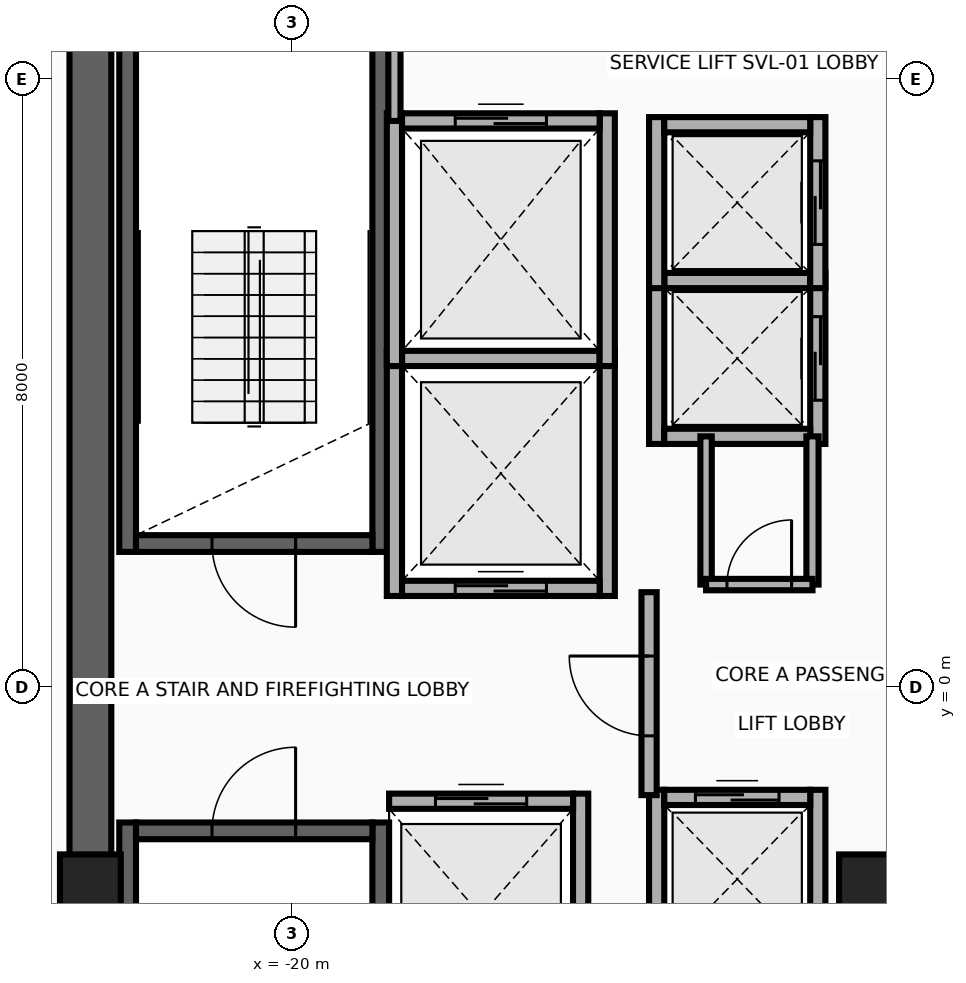
"""IFC4 building model, lengths in metres.
Left out: names, types, materials, properties, quantities, classifications, styles, units other than length and angle.
Written with IfcOpenShell. Run it as: python <this file> out.ifc"""

import sys

from ifc_helpers import new_model, si_unit, direction, frame, frame_2d, origin, origin_2d, place, context, subcontext, project, spatial, rectangle, extrude, source, transform, mapped, element, fill, save


model = new_model("IFC4")
c1 = context("Model", 3, precision=1e-05, world=origin(), true_north=direction((0.0, 1.0)))
c2 = subcontext(c1, "Body", "Model", "MODEL_VIEW")
j1 = project(units=[si_unit("LENGTHUNIT", "METRE"), si_unit("PLANEANGLEUNIT", "RADIAN")], contexts=[c1])
p1 = place(None, origin())
s1 = spatial("IfcSite", under=j1, at=p1, CompositionType="ELEMENT")
p2 = place(p1, origin())
s2 = spatial("IfcBuilding", under=s1, at=p2, CompositionType="ELEMENT")
p3 = place(p2, frame((0.0, 0.0, 266.0)))
s3 = spatial("IfcBuildingStorey", under=s2, at=p3, CompositionType="ELEMENT", Elevation=266.0)
for number, where, z_axis, x_axis in (
    (1, (-22.16, 1.78, 0.0), (0.0, 0.0, 1.0), (0.0, 1.0, 0.0)),
    (2, (-18.83, 1.78, 0.0), (0.0, 0.0, 1.0), (0.0, 1.0, 0.0)),
):
    element("IfcWall", number, at=place(p3, frame(where, z_axis=z_axis, x_axis=x_axis)), inside=s3, PredefinedType="SHEAR", context=c2, shape_type="SweptSolid", body=[
        extrude(rectangle(XDim=8.745, YDim=0.22, at=frame_2d((4.373, 0.0))), origin(), (0.0, 0.0, 1.0), 3.26),
    ])
p4 = place(p3, frame((-22.05, 1.89, 0.0), z_axis=(0.0, 0.0, 1.0), x_axis=(1.0, 0.0, 0.0)))
e3 = element("IfcWall", 3, at=p4, inside=s3, PredefinedType="SHEAR", context=c2, shape_type="SweptSolid", body=[
    extrude(rectangle(XDim=3.11, YDim=0.22, at=frame_2d((1.555, 0.0))), origin(), (0.0, 0.0, 1.0), 3.26),
])
p5 = place(p4, frame((1.0, 0.0, 0.0)))
e4 = element("IfcOpeningElement", 4, at=p5, cuts=e3, PredefinedType="OPENING", context=c2, shape_type="SweptSolid", body=[
    extrude(rectangle(XDim=1.1, YDim=2.15, at=frame_2d((0.55, 1.075))), frame((0.0, 0.125, 0.0), z_axis=(0.0, -1.0, 0.0), x_axis=(1.0, 0.0, 0.0)), (0.0, 0.0, 1.0), 0.25),
])
for number, where, z_axis, x_axis in (
    (5, (-22.16, -10.525, 0.0), (0.0, 0.0, 1.0), (0.0, 1.0, 0.0)),
    (6, (-18.83, -10.525, 0.0), (0.0, 0.0, 1.0), (0.0, 1.0, 0.0)),
):
    element("IfcWall", number, at=place(p3, frame(where, z_axis=z_axis, x_axis=x_axis)), inside=s3, PredefinedType="SHEAR", context=c2, shape_type="SweptSolid", body=[
        extrude(rectangle(XDim=8.745, YDim=0.22, at=frame_2d((4.373, 0.0))), origin(), (0.0, 0.0, 1.0), 3.26),
    ])
p6 = place(p3, frame((-22.05, -1.89, 0.0), z_axis=(0.0, 0.0, 1.0), x_axis=(1.0, 0.0, 0.0)))
e7 = element("IfcWall", 7, at=p6, inside=s3, PredefinedType="SHEAR", context=c2, shape_type="SweptSolid", body=[
    extrude(rectangle(XDim=3.11, YDim=0.22, at=frame_2d((1.555, 0.0))), origin(), (0.0, 0.0, 1.0), 3.26),
])
p7 = place(p6, frame((1.0, 0.0, 0.0)))
e8 = element("IfcOpeningElement", 8, at=p7, cuts=e7, PredefinedType="OPENING", context=c2, shape_type="SweptSolid", body=[
    extrude(rectangle(XDim=1.1, YDim=2.15, at=frame_2d((0.55, 1.075))), frame((0.0, 0.125, 0.0), z_axis=(0.0, -1.0, 0.0), x_axis=(1.0, 0.0, 0.0)), (0.0, 0.0, 1.0), 0.25),
])
p8 = place(p3, frame((-22.65, -11.075, 0.0), z_axis=(0.0, 0.0, 1.0), x_axis=(0.0, 1.0, 0.0)))
e9 = element("IfcWall", 9, at=p8, inside=s3, PredefinedType="SHEAR", context=c2, shape_type="SweptSolid", body=[
    extrude(rectangle(XDim=22.15, YDim=0.55, at=frame_2d((11.075, 0.0))), origin(), (0.0, 0.0, 1.0), 3.26),
])
m1 = source(origin(), c2, "Body", "SweptSolid", [
    extrude(rectangle(XDim=0.8, YDim=0.8, at=origin_2d()), origin(), (0.0, 0.0, 1.0), 3.5),
])
for number, where, z_axis, x_axis in (
    (10, (-22.65, -2.6, 0.0), (0.0, 0.0, 1.0), (1.0, 0.0, 0.0)),
    (11, (-12.4, -2.6, 0.0), (0.0, 0.0, 1.0), (1.0, 0.0, 0.0)),
):
    element("IfcColumn", number, at=place(p3, frame(where, z_axis=z_axis, x_axis=x_axis)), inside=s3, PredefinedType="COLUMN", context=c2, shape_type="MappedRepresentation", body=[
        mapped(m1, transform((0.0, 0.0, 0.0), x_axis=(1.0, 0.0, 0.0), y_axis=(0.0, 1.0, 0.0), z_axis=(0.0, 0.0, 1.0), scale=1.0)),
    ])
for number, where, z_axis, x_axis in (
    (12, (-18.65, 1.2, 0.0), (0.0, 0.0, 1.0), (0.0, 1.0, 0.0)),
    (13, (-15.85, 1.2, 0.0), (0.0, 0.0, 1.0), (0.0, 1.0, 0.0)),
):
    element("IfcWall", number, at=place(p3, frame(where, z_axis=z_axis, x_axis=x_axis)), inside=s3, PredefinedType="MOVABLE", context=c2, shape_type="SweptSolid", body=[
        extrude(rectangle(XDim=3.225, YDim=0.2, at=frame_2d((1.613, 0.0))), origin(), (0.0, 0.0, 1.0), 3.26),
    ])
p9 = place(p3, frame((-18.55, 1.3, 0.0), z_axis=(0.0, 0.0, 1.0), x_axis=(1.0, 0.0, 0.0)))
e14 = element("IfcWall", 14, at=p9, inside=s3, PredefinedType="MOVABLE", context=c2, shape_type="SweptSolid", body=[
    extrude(rectangle(XDim=2.6, YDim=0.2, at=frame_2d((1.3, 0.0))), origin(), (0.0, 0.0, 1.0), 3.26),
])
p10 = place(p9, frame((0.7, 0.0, 0.0)))
e15 = element("IfcOpeningElement", 15, at=p10, cuts=e14, PredefinedType="OPENING", context=c2, shape_type="SweptSolid", body=[
    extrude(rectangle(XDim=1.2, YDim=2.1, at=frame_2d((0.6, 1.05))), frame((0.0, 0.115, 0.0), z_axis=(0.0, -1.0, 0.0), x_axis=(1.0, 0.0, 0.0)), (0.0, 0.0, 1.0), 0.23),
])
p11 = place(p3, frame((-18.55, 4.325, 0.0), z_axis=(0.0, 0.0, 1.0), x_axis=(1.0, 0.0, 0.0)))
e16 = element("IfcWall", 16, at=p11, inside=s3, PredefinedType="MOVABLE", context=c2, shape_type="SweptSolid", body=[
    extrude(rectangle(XDim=2.6, YDim=0.2, at=frame_2d((1.3, 0.0))), origin(), (0.0, 0.0, 1.0), 3.26),
])
p12 = place(p3, frame((-16.2, -4.6, 0.0), z_axis=(0.0, 0.0, 1.0), x_axis=(0.0, 1.0, 0.0)))
e17 = element("IfcWall", 17, at=p12, inside=s3, PredefinedType="MOVABLE", context=c2, shape_type="SweptSolid", body=[
    extrude(rectangle(XDim=3.2, YDim=0.2, at=frame_2d((1.6, 0.0))), origin(), (0.0, 0.0, 1.0), 3.26),
])
p13 = place(p3, frame((-18.72, -1.5, 0.0), z_axis=(0.0, 0.0, 1.0), x_axis=(1.0, 0.0, 0.0)))
e18 = element("IfcWall", 18, at=p13, inside=s3, PredefinedType="MOVABLE", context=c2, shape_type="SweptSolid", body=[
    extrude(rectangle(XDim=2.42, YDim=0.2, at=frame_2d((1.21, 0.0))), origin(), (0.0, 0.0, 1.0), 3.26),
])
p14 = place(p13, frame((0.61, 0.0, 0.0)))
e19 = element("IfcOpeningElement", 19, at=p14, cuts=e18, PredefinedType="OPENING", context=c2, shape_type="SweptSolid", body=[
    extrude(rectangle(XDim=1.2, YDim=2.1, at=frame_2d((0.6, 1.05))), frame((0.0, 0.115, 0.0), z_axis=(0.0, -1.0, 0.0), x_axis=(1.0, 0.0, 0.0)), (0.0, 0.0, 1.0), 0.23),
])
for number, where, z_axis, x_axis in (
    (20, (-18.65, 4.225, 0.0), (0.0, 0.0, 1.0), (0.0, 1.0, 0.0)),
    (21, (-15.85, 4.225, 0.0), (0.0, 0.0, 1.0), (0.0, 1.0, 0.0)),
):
    element("IfcWall", number, at=place(p3, frame(where, z_axis=z_axis, x_axis=x_axis)), inside=s3, PredefinedType="MOVABLE", context=c2, shape_type="SweptSolid", body=[
        extrude(rectangle(XDim=3.325, YDim=0.2, at=frame_2d((1.663, 0.0))), origin(), (0.0, 0.0, 1.0), 3.26),
    ])
p15 = place(p3, frame((-18.55, 7.45, 0.0), z_axis=(0.0, 0.0, 1.0), x_axis=(1.0, 0.0, 0.0)))
e22 = element("IfcWall", 22, at=p15, inside=s3, PredefinedType="MOVABLE", context=c2, shape_type="SweptSolid", body=[
    extrude(rectangle(XDim=2.6, YDim=0.2, at=frame_2d((1.3, 0.0))), origin(), (0.0, 0.0, 1.0), 3.26),
])
p16 = place(p15, frame((0.7, 0.0, 0.0)))
e23 = element("IfcOpeningElement", 23, at=p16, cuts=e22, PredefinedType="OPENING", context=c2, shape_type="SweptSolid", body=[
    extrude(rectangle(XDim=1.2, YDim=2.1, at=frame_2d((0.6, 1.05))), frame((0.0, 0.115, 0.0), z_axis=(0.0, -1.0, 0.0), x_axis=(1.0, 0.0, 0.0)), (0.0, 0.0, 1.0), 0.23),
])
p17 = place(p3, frame((-15.2, 3.2, 0.0), z_axis=(0.0, 0.0, 1.0), x_axis=(0.0, 1.0, 0.0)))
e24 = element("IfcWall", 24, at=p17, inside=s3, PredefinedType="MOVABLE", context=c2, shape_type="SweptSolid", body=[
    extrude(rectangle(XDim=2.25, YDim=0.2, at=frame_2d((1.125, 0.0))), origin(), (0.0, 0.0, 1.0), 3.26),
])
p18 = place(p3, frame((-13.08, 3.2, 0.0), z_axis=(0.0, 0.0, 1.0), x_axis=(0.0, 1.0, 0.0)))
e25 = element("IfcWall", 25, at=p18, inside=s3, PredefinedType="MOVABLE", context=c2, shape_type="SweptSolid", body=[
    extrude(rectangle(XDim=2.25, YDim=0.2, at=frame_2d((1.125, 0.0))), origin(), (0.0, 0.0, 1.0), 3.26),
])
p19 = place(p18, frame((0.575, 0.0, 0.0)))
e26 = element("IfcOpeningElement", 26, at=p19, cuts=e25, PredefinedType="OPENING", context=c2, shape_type="SweptSolid", body=[
    extrude(rectangle(XDim=1.1, YDim=2.1, at=frame_2d((0.55, 1.05))), frame((0.0, 0.115, 0.0), z_axis=(0.0, -1.0, 0.0), x_axis=(1.0, 0.0, 0.0)), (0.0, 0.0, 1.0), 0.23),
])
for number, where, z_axis, x_axis in (
    (27, (-15.1, 3.3, 0.0), (0.0, 0.0, 1.0), (1.0, 0.0, 0.0)),
    (28, (-15.1, 5.35, 0.0), (0.0, 0.0, 1.0), (1.0, 0.0, 0.0)),
):
    element("IfcWall", number, at=place(p3, frame(where, z_axis=z_axis, x_axis=x_axis)), inside=s3, PredefinedType="MOVABLE", context=c2, shape_type="SweptSolid", body=[
        extrude(rectangle(XDim=1.92, YDim=0.2, at=frame_2d((0.96, 0.0))), origin(), (0.0, 0.0, 1.0), 3.26),
    ])
p20 = place(p3, frame((-15.2, 5.25, 0.0), z_axis=(0.0, 0.0, 1.0), x_axis=(0.0, 1.0, 0.0)))
e29 = element("IfcWall", 29, at=p20, inside=s3, PredefinedType="MOVABLE", context=c2, shape_type="SweptSolid", body=[
    extrude(rectangle(XDim=2.25, YDim=0.2, at=frame_2d((1.125, 0.0))), origin(), (0.0, 0.0, 1.0), 3.26),
])
p21 = place(p3, frame((-13.08, 5.25, 0.0), z_axis=(0.0, 0.0, 1.0), x_axis=(0.0, 1.0, 0.0)))
e30 = element("IfcWall", 30, at=p21, inside=s3, PredefinedType="MOVABLE", context=c2, shape_type="SweptSolid", body=[
    extrude(rectangle(XDim=2.25, YDim=0.2, at=frame_2d((1.125, 0.0))), origin(), (0.0, 0.0, 1.0), 3.26),
])
p22 = place(p21, frame((0.575, 0.0, 0.0)))
e31 = element("IfcOpeningElement", 31, at=p22, cuts=e30, PredefinedType="OPENING", context=c2, shape_type="SweptSolid", body=[
    extrude(rectangle(XDim=1.1, YDim=2.1, at=frame_2d((0.55, 1.05))), frame((0.0, 0.115, 0.0), z_axis=(0.0, -1.0, 0.0), x_axis=(1.0, 0.0, 0.0)), (0.0, 0.0, 1.0), 0.23),
])
p23 = place(p3, frame((-15.1, 7.4, 0.0), z_axis=(0.0, 0.0, 1.0), x_axis=(1.0, 0.0, 0.0)))
e32 = element("IfcWall", 32, at=p23, inside=s3, PredefinedType="MOVABLE", context=c2, shape_type="SweptSolid", body=[
    extrude(rectangle(XDim=1.92, YDim=0.2, at=frame_2d((0.96, 0.0))), origin(), (0.0, 0.0, 1.0), 3.26),
])
for number, where, z_axis, x_axis in (
    (33, (-15.2, -3.7, 0.0), (0.0, 0.0, 1.0), (0.0, 1.0, 0.0)),
    (34, (-13.08, -3.7, 0.0), (0.0, 0.0, 1.0), (0.0, 1.0, 0.0)),
):
    element("IfcWall", number, at=place(p3, frame(where, z_axis=z_axis, x_axis=x_axis)), inside=s3, PredefinedType="MOVABLE", context=c2, shape_type="SweptSolid", body=[
        extrude(rectangle(XDim=2.35, YDim=0.2, at=frame_2d((1.175, 0.0))), origin(), (0.0, 0.0, 1.0), 3.26),
    ])
p24 = place(p3, frame((-15.1, -1.45, 0.0), z_axis=(0.0, 0.0, 1.0), x_axis=(1.0, 0.0, 0.0)))
e35 = element("IfcWall", 35, at=p24, inside=s3, PredefinedType="MOVABLE", context=c2, shape_type="SweptSolid", body=[
    extrude(rectangle(XDim=1.92, YDim=0.2, at=frame_2d((0.96, 0.0))), origin(), (0.0, 0.0, 1.0), 3.26),
])
p25 = place(p24, frame((0.41, 0.0, 0.0)))
e36 = element("IfcOpeningElement", 36, at=p25, cuts=e35, PredefinedType="OPENING", context=c2, shape_type="SweptSolid", body=[
    extrude(rectangle(XDim=1.1, YDim=2.1, at=frame_2d((0.55, 1.05))), frame((0.0, 0.115, 0.0), z_axis=(0.0, -1.0, 0.0), x_axis=(1.0, 0.0, 0.0)), (0.0, 0.0, 1.0), 0.23),
])
p26 = place(p3, frame((-15.3, -1.42, 0.0), z_axis=(0.0, 0.0, 1.0), x_axis=(0.0, 1.0, 0.0)))
e37 = element("IfcWall", 37, at=p26, inside=s3, PredefinedType="PARTITIONING", context=c2, shape_type="SweptSolid", body=[
    extrude(rectangle(XDim=2.67, YDim=0.2, at=frame_2d((1.335, 0.0))), origin(), (0.0, 0.0, 1.0), 3.26),
])
p27 = place(p26, frame((0.78, 0.0, 0.0)))
e38 = element("IfcOpeningElement", 38, at=p27, cuts=e37, PredefinedType="OPENING", context=c2, shape_type="SweptSolid", body=[
    extrude(rectangle(XDim=1.05, YDim=2.15, at=frame_2d((0.525, 1.075))), frame((0.0, 0.115, 0.0), z_axis=(0.0, -1.0, 0.0), x_axis=(1.0, 0.0, 0.0)), (0.0, 0.0, 1.0), 0.23),
])
p28 = place(p3, frame((-18.65, 7.45, 0.0), z_axis=(0.0, 0.0, 1.0), x_axis=(0.0, 1.0, 0.0)))
e39 = element("IfcWall", 39, at=p28, inside=s3, PredefinedType="PARTITIONING", context=c2, shape_type="SweptSolid", body=[
    extrude(rectangle(XDim=2.93, YDim=0.16, at=frame_2d((1.465, 0.0))), origin(), (0.0, 0.0, 1.0), 3.26),
])
p29 = place(p3, frame((-13.15, 1.35, 0.0), z_axis=(0.0, 0.0, 1.0), x_axis=(0.0, 1.0, 0.0)))
e40 = element("IfcWall", 40, at=p29, inside=s3, PredefinedType="PARTITIONING", context=c2, shape_type="SweptSolid", body=[
    extrude(rectangle(XDim=1.95, YDim=0.16, at=frame_2d((0.975, 0.0))), origin(), (0.0, 0.0, 1.0), 3.26),
])
p30 = place(p3, frame((-14.55, 1.35, 0.0), z_axis=(0.0, 0.0, 1.0), x_axis=(0.0, 1.0, 0.0)))
e41 = element("IfcWall", 41, at=p30, inside=s3, PredefinedType="PARTITIONING", context=c2, shape_type="SweptSolid", body=[
    extrude(rectangle(XDim=1.95, YDim=0.15, at=frame_2d((0.975, 0.0))), origin(), (0.0, 0.0, 1.0), 3.26),
])
p31 = place(p3, frame((-14.55, 1.35, 0.0), z_axis=(0.0, 0.0, 1.0), x_axis=(1.0, 0.0, 0.0)))
e42 = element("IfcWall", 42, at=p31, inside=s3, PredefinedType="PARTITIONING", context=c2, shape_type="SweptSolid", body=[
    extrude(rectangle(XDim=1.4, YDim=0.15, at=frame_2d((0.7, 0.0))), origin(), (0.0, 0.0, 1.0), 3.26),
])
p32 = place(p31, frame((0.275, 0.0, 0.0)))
e43 = element("IfcOpeningElement", 43, at=p32, cuts=e42, PredefinedType="OPENING", context=c2, shape_type="SweptSolid", body=[
    extrude(rectangle(XDim=0.85, YDim=2.05, at=frame_2d((0.425, 1.025))), frame((0.0, 0.09, 0.0), z_axis=(0.0, -1.0, 0.0), x_axis=(1.0, 0.0, 0.0)), (0.0, 0.0, 1.0), 0.18),
])
p33 = place(p10, origin())
e44 = element("IfcDoor", 44, at=p33, inside=s3, OperationType="DOUBLE_DOOR_SLIDING", PredefinedType="DOOR", context=c2, shape_type="SweptSolid", body=[
    extrude(rectangle(XDim=1.2, YDim=2.1, at=frame_2d((0.6, 1.05))), frame((0.0, 0.025, 0.0), z_axis=(0.0, -1.0, 0.0), x_axis=(1.0, 0.0, 0.0)), (0.0, 0.0, 1.0), 0.05),
])
fill(e15, e44)
p34 = place(p14, origin())
e45 = element("IfcDoor", 45, at=p34, inside=s3, OperationType="DOUBLE_DOOR_SLIDING", PredefinedType="DOOR", context=c2, shape_type="SweptSolid", body=[
    extrude(rectangle(XDim=1.2, YDim=2.1, at=frame_2d((0.6, 1.05))), frame((0.0, 0.025, 0.0), z_axis=(0.0, -1.0, 0.0), x_axis=(1.0, 0.0, 0.0)), (0.0, 0.0, 1.0), 0.05),
])
fill(e19, e45)
p35 = place(p16, origin())
e46 = element("IfcDoor", 46, at=p35, inside=s3, OperationType="DOUBLE_DOOR_SLIDING", PredefinedType="DOOR", context=c2, shape_type="SweptSolid", body=[
    extrude(rectangle(XDim=1.2, YDim=2.1, at=frame_2d((0.6, 1.05))), frame((0.0, 0.025, 0.0), z_axis=(0.0, -1.0, 0.0), x_axis=(1.0, 0.0, 0.0)), (0.0, 0.0, 1.0), 0.05),
])
fill(e23, e46)
p36 = place(p19, origin())
e47 = element("IfcDoor", 47, at=p36, inside=s3, OperationType="DOUBLE_DOOR_SLIDING", PredefinedType="DOOR", context=c2, shape_type="SweptSolid", body=[
    extrude(rectangle(XDim=1.1, YDim=2.1, at=frame_2d((0.55, 1.05))), frame((0.0, 0.025, 0.0), z_axis=(0.0, -1.0, 0.0), x_axis=(1.0, 0.0, 0.0)), (0.0, 0.0, 1.0), 0.05),
])
fill(e26, e47)
p37 = place(p22, origin())
e48 = element("IfcDoor", 48, at=p37, inside=s3, OperationType="DOUBLE_DOOR_SLIDING", PredefinedType="DOOR", context=c2, shape_type="SweptSolid", body=[
    extrude(rectangle(XDim=1.1, YDim=2.1, at=frame_2d((0.55, 1.05))), frame((0.0, 0.025, 0.0), z_axis=(0.0, -1.0, 0.0), x_axis=(1.0, 0.0, 0.0)), (0.0, 0.0, 1.0), 0.05),
])
fill(e31, e48)
p38 = place(p25, origin())
e49 = element("IfcDoor", 49, at=p38, inside=s3, OperationType="DOUBLE_DOOR_SLIDING", PredefinedType="DOOR", context=c2, shape_type="SweptSolid", body=[
    extrude(rectangle(XDim=1.1, YDim=2.1, at=frame_2d((0.55, 1.05))), frame((0.0, 0.025, 0.0), z_axis=(0.0, -1.0, 0.0), x_axis=(1.0, 0.0, 0.0)), (0.0, 0.0, 1.0), 0.05),
])
fill(e36, e49)
p39 = place(p27, origin())
e50 = element("IfcDoor", 50, at=p39, inside=s3, OperationType="SINGLE_SWING_RIGHT", PredefinedType="DOOR", context=c2, shape_type="SweptSolid", body=[
    extrude(rectangle(XDim=1.05, YDim=2.15, at=frame_2d((0.525, 1.075))), frame((0.0, 0.025, 0.0), z_axis=(0.0, -1.0, 0.0), x_axis=(1.0, 0.0, 0.0)), (0.0, 0.0, 1.0), 0.05),
])
fill(e38, e50)
p40 = place(p5, frame((1.1, 0.0, 0.0), z_axis=(0.0, 0.0, 1.0), x_axis=(-1.0, 0.0, 0.0)))
e51 = element("IfcDoor", 51, at=p40, inside=s3, OperationType="SINGLE_SWING_LEFT", PredefinedType="DOOR", context=c2, shape_type="SweptSolid", body=[
    extrude(rectangle(XDim=1.1, YDim=2.15, at=frame_2d((0.55, 1.075))), frame((0.0, 0.025, 0.0), z_axis=(0.0, -1.0, 0.0), x_axis=(1.0, 0.0, 0.0)), (0.0, 0.0, 1.0), 0.05),
])
fill(e4, e51)
p41 = place(p7, origin())
e52 = element("IfcDoor", 52, at=p41, inside=s3, OperationType="SINGLE_SWING_RIGHT", PredefinedType="DOOR", context=c2, shape_type="SweptSolid", body=[
    extrude(rectangle(XDim=1.1, YDim=2.15, at=frame_2d((0.55, 1.075))), frame((0.0, 0.025, 0.0), z_axis=(0.0, -1.0, 0.0), x_axis=(1.0, 0.0, 0.0)), (0.0, 0.0, 1.0), 0.05),
])
fill(e8, e52)
p42 = place(p32, origin())
e53 = element("IfcDoor", 53, at=p42, inside=s3, OperationType="SINGLE_SWING_LEFT", PredefinedType="DOOR", context=c2, shape_type="SweptSolid", body=[
    extrude(rectangle(XDim=0.85, YDim=2.05, at=frame_2d((0.425, 1.025))), frame((0.0, 0.025, 0.0), z_axis=(0.0, -1.0, 0.0), x_axis=(1.0, 0.0, 0.0)), (0.0, 0.0, 1.0), 0.05),
])
fill(e43, e53)
save(model, sys.argv[1])
